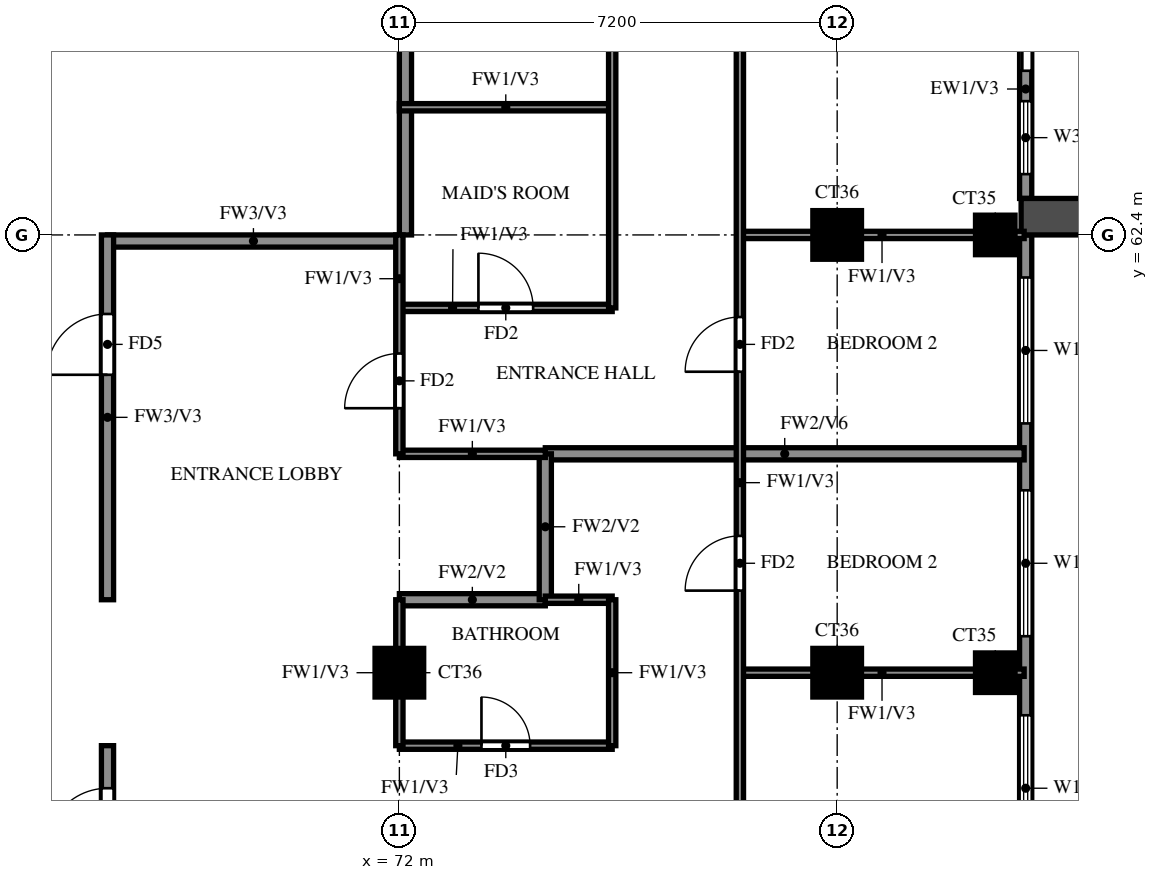
"""IFC4 building model, lengths in metres.
Left out: names, types, materials, properties, quantities, classifications, styles, units other than length and angle.
Written with IfcOpenShell. Run it as: python <this file> out.ifc"""

import sys

from ifc_helpers import new_model, si_unit, direction, frame, frame_2d, origin, origin_2d, place, context, subcontext, project, spatial, rectangle, extrude, source, transform, mapped, element, fill, save


model = new_model("IFC4")
c1 = context("Model", 3, precision=1e-05, world=origin(), true_north=direction((0.0, 1.0)))
c2 = subcontext(c1, "Body", "Model", "MODEL_VIEW")
j1 = project(units=[si_unit("LENGTHUNIT", "METRE"), si_unit("PLANEANGLEUNIT", "RADIAN")], contexts=[c1])
p1 = place(None, origin())
s1 = spatial("IfcSite", under=j1, at=p1, CompositionType="ELEMENT")
p2 = place(p1, origin())
s2 = spatial("IfcBuilding", under=s1, at=p2, CompositionType="ELEMENT")
p3 = place(p2, frame((0.0, 0.0, 250.0)))
s3 = spatial("IfcBuildingStorey", under=s2, at=p3, CompositionType="ELEMENT", Elevation=250.0)
m1 = source(origin(), c2, "Body", "SweptSolid", [
    extrude(rectangle(XDim=0.8, YDim=0.8, at=origin_2d()), origin(), (0.0, 0.0, 1.0), 3.22),
])
for number, where, z_axis, x_axis in (
    (1, (72.0, 55.2, 0.0), (0.0, 0.0, 1.0), (1.0, 0.0, 0.0)),
    (2, (79.2, 55.2, 0.0), (0.0, 0.0, 1.0), (1.0, 0.0, 0.0)),
):
    element("IfcColumn", number, at=place(p3, frame(where, z_axis=z_axis, x_axis=x_axis)), inside=s3, PredefinedType="COLUMN", context=c2, shape_type="MappedRepresentation", body=[
        mapped(m1, transform((0.0, 0.0, 0.0))),
    ])
m2 = source(origin(), c2, "Body", "SweptSolid", [
    extrude(rectangle(XDim=0.65, YDim=0.65, at=origin_2d()), origin(), (0.0, 0.0, 1.0), 3.22),
])
p4 = place(p3, frame((81.8, 55.2, 0.0), z_axis=(0.0, 0.0, 1.0), x_axis=(1.0, 0.0, 0.0)))
e3 = element("IfcColumn", 3, at=p4, inside=s3, PredefinedType="COLUMN", context=c2, shape_type="MappedRepresentation", body=[
    mapped(m2, transform((0.0, 0.0, 0.0))),
])
p5 = place(p3, frame((79.2, 62.4, 0.0), z_axis=(0.0, 0.0, 1.0), x_axis=(1.0, 0.0, 0.0)))
e4 = element("IfcColumn", 4, at=p5, inside=s3, PredefinedType="COLUMN", context=c2, shape_type="MappedRepresentation", body=[
    mapped(m1, transform((0.0, 0.0, 0.0))),
])
p6 = place(p3, frame((81.8, 62.4, 0.0), z_axis=(0.0, 0.0, 1.0), x_axis=(1.0, 0.0, 0.0)))
e5 = element("IfcColumn", 5, at=p6, inside=s3, PredefinedType="COLUMN", context=c2, shape_type="MappedRepresentation", body=[
    mapped(m2, transform((0.0, 0.0, 0.0))),
])
p7 = place(p3, frame((82.3, 48.2, 0.0), z_axis=(0.0, 0.0, 1.0), x_axis=(0.0, 1.0, 0.0)))
e6 = element("IfcWall", 6, at=p7, inside=s3, PredefinedType="SOLIDWALL", context=c2, shape_type="SweptSolid", body=[
    extrude(rectangle(XDim=14.2, YDim=0.2, at=frame_2d((7.1, 0.0))), origin(), (0.0, 0.0, 1.0), 3.22),
])
p8 = place(p7, frame((0.9, 0.0, 0.6)))
e7 = element("IfcOpeningElement", 7, at=p8, cuts=e6, PredefinedType="OPENING", context=c2, shape_type="SweptSolid", body=[
    extrude(rectangle(XDim=2.4, YDim=2.4, at=frame_2d((1.2, 1.2))), frame((0.0, 0.11, 0.0), z_axis=(0.0, -1.0, 0.0), x_axis=(1.0, 0.0, 0.0)), (0.0, 0.0, 1.0), 0.22),
])
p9 = place(p7, frame((3.9, 0.0, 0.6)))
e8 = element("IfcOpeningElement", 8, at=p9, cuts=e6, PredefinedType="OPENING", context=c2, shape_type="SweptSolid", body=[
    extrude(rectangle(XDim=2.4, YDim=2.4, at=frame_2d((1.2, 1.2))), frame((0.0, 0.11, 0.0), z_axis=(0.0, -1.0, 0.0), x_axis=(1.0, 0.0, 0.0)), (0.0, 0.0, 1.0), 0.22),
])
p10 = place(p7, frame((7.6, 0.0, 0.6)))
e9 = element("IfcOpeningElement", 9, at=p10, cuts=e6, PredefinedType="OPENING", context=c2, shape_type="SweptSolid", body=[
    extrude(rectangle(XDim=2.4, YDim=2.4, at=frame_2d((1.2, 1.2))), frame((0.0, 0.11, 0.0), z_axis=(0.0, -1.0, 0.0), x_axis=(1.0, 0.0, 0.0)), (0.0, 0.0, 1.0), 0.22),
])
p11 = place(p7, frame((11.1, 0.0, 0.6)))
e10 = element("IfcOpeningElement", 10, at=p11, cuts=e6, PredefinedType="OPENING", context=c2, shape_type="SweptSolid", body=[
    extrude(rectangle(XDim=2.4, YDim=2.4, at=frame_2d((1.2, 1.2))), frame((0.0, 0.11, 0.0), z_axis=(0.0, -1.0, 0.0), x_axis=(1.0, 0.0, 0.0)), (0.0, 0.0, 1.0), 0.22),
])
p12 = place(p3, frame((82.3, 63.0, 0.0), z_axis=(0.0, 0.0, 1.0), x_axis=(0.0, 1.0, 0.0)))
e11 = element("IfcWall", 11, at=p12, inside=s3, PredefinedType="SOLIDWALL", context=c2, shape_type="SweptSolid", body=[
    extrude(rectangle(XDim=6.0, YDim=0.2, at=frame_2d((3.0, 0.0))), origin(), (0.0, 0.0, 1.0), 3.22),
])
p13 = place(p12, frame((2.1, 0.0, 0.0)))
e12 = element("IfcOpeningElement", 12, at=p13, cuts=e11, PredefinedType="OPENING", context=c2, shape_type="SweptSolid", body=[
    extrude(rectangle(XDim=1.8, YDim=2.4, at=frame_2d((0.9, 1.2))), frame((0.0, 0.11, 0.0), z_axis=(0.0, -1.0, 0.0), x_axis=(1.0, 0.0, 0.0)), (0.0, 0.0, 1.0), 0.22),
])
p14 = place(p12, frame((0.4, 0.0, 0.6)))
e13 = element("IfcOpeningElement", 13, at=p14, cuts=e11, PredefinedType="OPENING", context=c2, shape_type="SweptSolid", body=[
    extrude(rectangle(XDim=1.2, YDim=2.4, at=frame_2d((0.6, 1.2))), frame((0.0, 0.11, 0.0), z_axis=(0.0, -1.0, 0.0), x_axis=(1.0, 0.0, 0.0)), (0.0, 0.0, 1.0), 0.22),
])
p15 = place(p12, frame((4.4, 0.0, 0.6)))
e14 = element("IfcOpeningElement", 14, at=p15, cuts=e11, PredefinedType="OPENING", context=c2, shape_type="SweptSolid", body=[
    extrude(rectangle(XDim=1.2, YDim=2.4, at=frame_2d((0.6, 1.2))), frame((0.0, 0.11, 0.0), z_axis=(0.0, -1.0, 0.0), x_axis=(1.0, 0.0, 0.0)), (0.0, 0.0, 1.0), 0.22),
])
p16 = place(p3, frame((82.225, 62.7, 0.0), z_axis=(0.0, 0.0, 1.0), x_axis=(1.0, 0.0, 0.0)))
e15 = element("IfcWall", 15, at=p16, inside=s3, PredefinedType="SOLIDWALL", context=c2, shape_type="SweptSolid", body=[
    extrude(rectangle(XDim=2.875, YDim=0.6, at=frame_2d((1.438, 0.0))), origin(), (0.0, 0.0, 1.0), 2.85),
])
p17 = place(p3, frame((67.2, 62.3, 0.0), z_axis=(0.0, 0.0, 1.0), x_axis=(1.0, 0.0, 0.0)))
e16 = element("IfcWall", 16, at=p17, inside=s3, PredefinedType="SOLIDWALL", context=c2, shape_type="SweptSolid", body=[
    extrude(rectangle(XDim=4.8, YDim=0.2, at=frame_2d((2.4, 0.0))), origin(), (0.0, 0.0, 1.0), 3.22),
])
p18 = place(p3, frame((67.2, 45.6, 0.0), z_axis=(0.0, 0.0, 1.0), x_axis=(0.0, 1.0, 0.0)))
e17 = element("IfcWall", 17, at=p18, inside=s3, PredefinedType="SOLIDWALL", context=c2, shape_type="SweptSolid", body=[
    extrude(rectangle(XDim=8.4, YDim=0.2, at=frame_2d((4.2, 0.0))), origin(), (0.0, 0.0, 1.0), 3.22),
])
p19 = place(p18, frame((6.7, 0.0, 0.0)))
e18 = element("IfcOpeningElement", 18, at=p19, cuts=e17, PredefinedType="OPENING", context=c2, shape_type="SweptSolid", body=[
    extrude(rectangle(XDim=1.0, YDim=2.1, at=frame_2d((0.5, 1.05))), frame((0.0, 0.11, 0.0), z_axis=(0.0, -1.0, 0.0), x_axis=(1.0, 0.0, 0.0)), (0.0, 0.0, 1.0), 0.22),
])
p20 = place(p18, frame((0.7, 0.0, 0.0)))
e19 = element("IfcOpeningElement", 19, at=p20, cuts=e17, PredefinedType="OPENING", context=c2, shape_type="SweptSolid", body=[
    extrude(rectangle(XDim=1.0, YDim=2.1, at=frame_2d((0.5, 1.05))), frame((0.0, 0.11, 0.0), z_axis=(0.0, -1.0, 0.0), x_axis=(1.0, 0.0, 0.0)), (0.0, 0.0, 1.0), 0.22),
])
p21 = place(p3, frame((67.2, 56.4, 0.0), z_axis=(0.0, 0.0, 1.0), x_axis=(0.0, 1.0, 0.0)))
e20 = element("IfcWall", 20, at=p21, inside=s3, PredefinedType="SOLIDWALL", context=c2, shape_type="SweptSolid", body=[
    extrude(rectangle(XDim=6.0, YDim=0.2, at=frame_2d((3.0, 0.0))), origin(), (0.0, 0.0, 1.0), 3.22),
])
p22 = place(p21, frame((3.7, 0.0, 0.0)))
e21 = element("IfcOpeningElement", 21, at=p22, cuts=e20, PredefinedType="OPENING", context=c2, shape_type="SweptSolid", body=[
    extrude(rectangle(XDim=1.0, YDim=2.1, at=frame_2d((0.5, 1.05))), frame((0.0, 0.11, 0.0), z_axis=(0.0, -1.0, 0.0), x_axis=(1.0, 0.0, 0.0)), (0.0, 0.0, 1.0), 0.22),
])
p23 = place(p3, frame((72.1, 62.4, 0.0), z_axis=(0.0, 0.0, 1.0), x_axis=(0.0, 1.0, 0.0)))
e22 = element("IfcWall", 22, at=p23, inside=s3, PredefinedType="SOLIDWALL", context=c2, shape_type="SweptSolid", body=[
    extrude(rectangle(XDim=15.6, YDim=0.2, at=frame_2d((7.8, 0.0))), origin(), (0.0, 0.0, 1.0), 3.22),
])
p24 = place(p3, frame((72.0, 56.4, 0.0), z_axis=(0.0, 0.0, 1.0), x_axis=(1.0, 0.0, 0.0)))
e23 = element("IfcWall", 23, at=p24, inside=s3, PredefinedType="SOLIDWALL", context=c2, shape_type="SweptSolid", body=[
    extrude(rectangle(XDim=2.4, YDim=0.2, at=frame_2d((1.2, 0.0))), origin(), (0.0, 0.0, 1.0), 3.22),
])
p25 = place(p3, frame((74.4, 58.8, 0.0), z_axis=(0.0, 0.0, 1.0), x_axis=(1.0, 0.0, 0.0)))
e24 = element("IfcWall", 24, at=p25, inside=s3, PredefinedType="SOLIDWALL", context=c2, shape_type="SweptSolid", body=[
    extrude(rectangle(XDim=7.875, YDim=0.2, at=frame_2d((3.938, 0.0))), origin(), (0.0, 0.0, 1.0), 2.32),
])
p26 = place(p3, frame((74.4, 56.4, 0.0), z_axis=(0.0, 0.0, 1.0), x_axis=(0.0, 1.0, 0.0)))
e25 = element("IfcWall", 25, at=p26, inside=s3, PredefinedType="SOLIDWALL", context=c2, shape_type="SweptSolid", body=[
    extrude(rectangle(XDim=2.4, YDim=0.2, at=frame_2d((1.2, 0.0))), origin(), (0.0, 0.0, 1.0), 3.22),
])
p27 = place(p3, frame((72.0, 54.0, 0.0), z_axis=(0.0, 0.0, 1.0), x_axis=(1.0, 0.0, 0.0)))
e26 = element("IfcWall", 26, at=p27, inside=s3, PredefinedType="PARTITIONING", context=c2, shape_type="SweptSolid", body=[
    extrude(rectangle(XDim=3.5, YDim=0.12, at=frame_2d((1.75, 0.0))), origin(), (0.0, 0.0, 1.0), 3.22),
])
p28 = place(p27, frame((1.35, 0.0, 0.0)))
e27 = element("IfcOpeningElement", 27, at=p28, cuts=e26, PredefinedType="OPENING", context=c2, shape_type="SweptSolid", body=[
    extrude(rectangle(XDim=0.8, YDim=2.1, at=frame_2d((0.4, 1.05))), frame((0.0, 0.07, 0.0), z_axis=(0.0, -1.0, 0.0), x_axis=(1.0, 0.0, 0.0)), (0.0, 0.0, 1.0), 0.14),
])
p29 = place(p3, frame((77.6, 55.2, 0.0), z_axis=(0.0, 0.0, 1.0), x_axis=(1.0, 0.0, 0.0)))
e28 = element("IfcWall", 28, at=p29, inside=s3, PredefinedType="PARTITIONING", context=c2, shape_type="SweptSolid", body=[
    extrude(rectangle(XDim=4.675, YDim=0.12, at=frame_2d((2.337, 0.0))), origin(), (0.0, 0.0, 1.0), 3.22),
])
p30 = place(p3, frame((74.4, 56.4, 0.0), z_axis=(0.0, 0.0, 1.0), x_axis=(1.0, 0.0, 0.0)))
e29 = element("IfcWall", 29, at=p30, inside=s3, PredefinedType="PARTITIONING", context=c2, shape_type="SweptSolid", body=[
    extrude(rectangle(XDim=1.1, YDim=0.12, at=frame_2d((0.55, 0.0))), origin(), (0.0, 0.0, 1.0), 3.22),
])
p31 = place(p3, frame((72.0, 58.8, 0.0), z_axis=(0.0, 0.0, 1.0), x_axis=(1.0, 0.0, 0.0)))
e30 = element("IfcWall", 30, at=p31, inside=s3, PredefinedType="PARTITIONING", context=c2, shape_type="SweptSolid", body=[
    extrude(rectangle(XDim=2.4, YDim=0.12, at=frame_2d((1.2, 0.0))), origin(), (0.0, 0.0, 1.0), 3.22),
])
p32 = place(p3, frame((72.0, 61.2, 0.0), z_axis=(0.0, 0.0, 1.0), x_axis=(1.0, 0.0, 0.0)))
e31 = element("IfcWall", 31, at=p32, inside=s3, PredefinedType="PARTITIONING", context=c2, shape_type="SweptSolid", body=[
    extrude(rectangle(XDim=3.5, YDim=0.12, at=frame_2d((1.75, 0.0))), origin(), (0.0, 0.0, 1.0), 3.22),
])
p33 = place(p32, frame((1.3, 0.0, 0.0)))
e32 = element("IfcOpeningElement", 32, at=p33, cuts=e31, PredefinedType="OPENING", context=c2, shape_type="SweptSolid", body=[
    extrude(rectangle(XDim=0.9, YDim=2.1, at=frame_2d((0.45, 1.05))), frame((0.0, 0.07, 0.0), z_axis=(0.0, -1.0, 0.0), x_axis=(1.0, 0.0, 0.0)), (0.0, 0.0, 1.0), 0.14),
])
p34 = place(p3, frame((77.6, 62.4, 0.0), z_axis=(0.0, 0.0, 1.0), x_axis=(1.0, 0.0, 0.0)))
e33 = element("IfcWall", 33, at=p34, inside=s3, PredefinedType="PARTITIONING", context=c2, shape_type="SweptSolid", body=[
    extrude(rectangle(XDim=4.675, YDim=0.12, at=frame_2d((2.337, 0.0))), origin(), (0.0, 0.0, 1.0), 3.22),
])
p35 = place(p3, frame((72.0, 64.5, 0.0), z_axis=(0.0, 0.0, 1.0), x_axis=(1.0, 0.0, 0.0)))
e34 = element("IfcWall", 34, at=p35, inside=s3, PredefinedType="PARTITIONING", context=c2, shape_type="SweptSolid", body=[
    extrude(rectangle(XDim=3.5, YDim=0.12, at=frame_2d((1.75, 0.0))), origin(), (0.0, 0.0, 1.0), 3.22),
])
p36 = place(p3, frame((72.0, 54.0, 0.0), z_axis=(0.0, 0.0, 1.0), x_axis=(0.0, 1.0, 0.0)))
e35 = element("IfcWall", 35, at=p36, inside=s3, PredefinedType="PARTITIONING", context=c2, shape_type="SweptSolid", body=[
    extrude(rectangle(XDim=2.4, YDim=0.12, at=frame_2d((1.2, 0.0))), origin(), (0.0, 0.0, 1.0), 3.22),
])
p37 = place(p3, frame((72.0, 58.8, 0.0), z_axis=(0.0, 0.0, 1.0), x_axis=(0.0, 1.0, 0.0)))
e36 = element("IfcWall", 36, at=p37, inside=s3, PredefinedType="PARTITIONING", context=c2, shape_type="SweptSolid", body=[
    extrude(rectangle(XDim=3.6, YDim=0.12, at=frame_2d((1.8, 0.0))), origin(), (0.0, 0.0, 1.0), 3.22),
])
p38 = place(p37, frame((0.75, 0.0, 0.0)))
e37 = element("IfcOpeningElement", 37, at=p38, cuts=e36, PredefinedType="OPENING", context=c2, shape_type="SweptSolid", body=[
    extrude(rectangle(XDim=0.9, YDim=2.1, at=frame_2d((0.45, 1.05))), frame((0.0, 0.07, 0.0), z_axis=(0.0, -1.0, 0.0), x_axis=(1.0, 0.0, 0.0)), (0.0, 0.0, 1.0), 0.14),
])
p39 = place(p3, frame((75.5, 54.0, 0.0), z_axis=(0.0, 0.0, 1.0), x_axis=(0.0, 1.0, 0.0)))
e38 = element("IfcWall", 38, at=p39, inside=s3, PredefinedType="PARTITIONING", context=c2, shape_type="SweptSolid", body=[
    extrude(rectangle(XDim=2.4, YDim=0.12, at=frame_2d((1.2, 0.0))), origin(), (0.0, 0.0, 1.0), 3.22),
])
p40 = place(p3, frame((75.5, 61.2, 0.0), z_axis=(0.0, 0.0, 1.0), x_axis=(0.0, 1.0, 0.0)))
e39 = element("IfcWall", 39, at=p40, inside=s3, PredefinedType="PARTITIONING", context=c2, shape_type="SweptSolid", body=[
    extrude(rectangle(XDim=12.0, YDim=0.12, at=frame_2d((6.0, 0.0))), origin(), (0.0, 0.0, 1.0), 3.22),
])
p41 = place(p40, frame((5.3, 0.0, 0.0)))
e40 = element("IfcOpeningElement", 40, at=p41, cuts=e39, PredefinedType="OPENING", context=c2, shape_type="SweptSolid", body=[
    extrude(rectangle(XDim=0.9, YDim=2.1, at=frame_2d((0.45, 1.05))), frame((0.0, 0.07, 0.0), z_axis=(0.0, -1.0, 0.0), x_axis=(1.0, 0.0, 0.0)), (0.0, 0.0, 1.0), 0.14),
])
p42 = place(p40, frame((9.7, 0.0, 0.0)))
e41 = element("IfcOpeningElement", 41, at=p42, cuts=e39, PredefinedType="OPENING", context=c2, shape_type="SweptSolid", body=[
    extrude(rectangle(XDim=0.8, YDim=2.1, at=frame_2d((0.4, 1.05))), frame((0.0, 0.07, 0.0), z_axis=(0.0, -1.0, 0.0), x_axis=(1.0, 0.0, 0.0)), (0.0, 0.0, 1.0), 0.14),
])
p43 = place(p3, frame((77.6, 48.125, 0.0), z_axis=(0.0, 0.0, 1.0), x_axis=(0.0, 1.0, 0.0)))
e42 = element("IfcWall", 42, at=p43, inside=s3, PredefinedType="PARTITIONING", context=c2, shape_type="SweptSolid", body=[
    extrude(rectangle(XDim=21.475, YDim=0.12, at=frame_2d((10.738, 0.0))), origin(), (0.0, 0.0, 1.0), 3.22),
])
p44 = place(p43, frame((2.788, 0.0, 0.0)))
e43 = element("IfcOpeningElement", 43, at=p44, cuts=e42, PredefinedType="OPENING", context=c2, shape_type="SweptSolid", body=[
    extrude(rectangle(XDim=1.5, YDim=2.1, at=frame_2d((0.75, 1.05))), frame((0.0, 0.07, 0.0), z_axis=(0.0, -1.0, 0.0), x_axis=(1.0, 0.0, 0.0)), (0.0, 0.0, 1.0), 0.14),
])
p45 = place(p43, frame((8.425, 0.0, 0.0)))
e44 = element("IfcOpeningElement", 44, at=p45, cuts=e42, PredefinedType="OPENING", context=c2, shape_type="SweptSolid", body=[
    extrude(rectangle(XDim=0.9, YDim=2.1, at=frame_2d((0.45, 1.05))), frame((0.0, 0.07, 0.0), z_axis=(0.0, -1.0, 0.0), x_axis=(1.0, 0.0, 0.0)), (0.0, 0.0, 1.0), 0.14),
])
p46 = place(p43, frame((12.025, 0.0, 0.0)))
e45 = element("IfcOpeningElement", 45, at=p46, cuts=e42, PredefinedType="OPENING", context=c2, shape_type="SweptSolid", body=[
    extrude(rectangle(XDim=0.9, YDim=2.1, at=frame_2d((0.45, 1.05))), frame((0.0, 0.07, 0.0), z_axis=(0.0, -1.0, 0.0), x_axis=(1.0, 0.0, 0.0)), (0.0, 0.0, 1.0), 0.14),
])
p47 = place(p43, frame((17.425, 0.0, 0.0)))
e46 = element("IfcOpeningElement", 46, at=p47, cuts=e42, PredefinedType="OPENING", context=c2, shape_type="SweptSolid", body=[
    extrude(rectangle(XDim=0.9, YDim=2.1, at=frame_2d((0.45, 1.05))), frame((0.0, 0.07, 0.0), z_axis=(0.0, -1.0, 0.0), x_axis=(1.0, 0.0, 0.0)), (0.0, 0.0, 1.0), 0.14),
])
p48 = place(p9, origin())
e47 = element("IfcWindow", 47, at=p48, inside=s3, PartitioningType="DOUBLE_PANEL_VERTICAL", PredefinedType="WINDOW", context=c2, shape_type="SweptSolid", body=[
    extrude(rectangle(XDim=2.4, YDim=2.4, at=frame_2d((1.2, 1.2))), frame((0.0, 0.03, 0.0), z_axis=(0.0, -1.0, 0.0), x_axis=(1.0, 0.0, 0.0)), (0.0, 0.0, 1.0), 0.06),
])
fill(e8, e47)
p49 = place(p10, origin())
e48 = element("IfcWindow", 48, at=p49, inside=s3, PartitioningType="DOUBLE_PANEL_VERTICAL", PredefinedType="WINDOW", context=c2, shape_type="SweptSolid", body=[
    extrude(rectangle(XDim=2.4, YDim=2.4, at=frame_2d((1.2, 1.2))), frame((0.0, 0.03, 0.0), z_axis=(0.0, -1.0, 0.0), x_axis=(1.0, 0.0, 0.0)), (0.0, 0.0, 1.0), 0.06),
])
fill(e9, e48)
p50 = place(p11, origin())
e49 = element("IfcWindow", 49, at=p50, inside=s3, PartitioningType="DOUBLE_PANEL_VERTICAL", PredefinedType="WINDOW", context=c2, shape_type="SweptSolid", body=[
    extrude(rectangle(XDim=2.4, YDim=2.4, at=frame_2d((1.2, 1.2))), frame((0.0, 0.03, 0.0), z_axis=(0.0, -1.0, 0.0), x_axis=(1.0, 0.0, 0.0)), (0.0, 0.0, 1.0), 0.06),
])
fill(e10, e49)
p51 = place(p13, origin())
e50 = element("IfcDoor", 50, at=p51, inside=s3, OperationType="DOUBLE_DOOR_SLIDING", PredefinedType="DOOR", context=c2, shape_type="SweptSolid", body=[
    extrude(rectangle(XDim=1.8, YDim=2.4, at=frame_2d((0.9, 1.2))), frame((0.0, 0.025, 0.0), z_axis=(0.0, -1.0, 0.0), x_axis=(1.0, 0.0, 0.0)), (0.0, 0.0, 1.0), 0.05),
])
fill(e12, e50)
p52 = place(p14, origin())
e51 = element("IfcWindow", 51, at=p52, inside=s3, PartitioningType="SINGLE_PANEL", PredefinedType="WINDOW", context=c2, shape_type="SweptSolid", body=[
    extrude(rectangle(XDim=1.2, YDim=2.4, at=frame_2d((0.6, 1.2))), frame((0.0, 0.03, 0.0), z_axis=(0.0, -1.0, 0.0), x_axis=(1.0, 0.0, 0.0)), (0.0, 0.0, 1.0), 0.06),
])
fill(e13, e51)
p53 = place(p19, origin())
e52 = element("IfcDoor", 52, at=p53, inside=s3, OperationType="SINGLE_SWING_LEFT", PredefinedType="DOOR", context=c2, shape_type="SweptSolid", body=[
    extrude(rectangle(XDim=1.0, YDim=2.1, at=frame_2d((0.5, 1.05))), frame((0.0, 0.025, 0.0), z_axis=(0.0, -1.0, 0.0), x_axis=(1.0, 0.0, 0.0)), (0.0, 0.0, 1.0), 0.05),
])
fill(e18, e52)
p54 = place(p45, origin())
e53 = element("IfcDoor", 53, at=p54, inside=s3, OperationType="SINGLE_SWING_LEFT", PredefinedType="DOOR", context=c2, shape_type="SweptSolid", body=[
    extrude(rectangle(XDim=0.9, YDim=2.1, at=frame_2d((0.45, 1.05))), frame((0.0, 0.025, 0.0), z_axis=(0.0, -1.0, 0.0), x_axis=(1.0, 0.0, 0.0)), (0.0, 0.0, 1.0), 0.05),
])
fill(e44, e53)
p55 = place(p28, origin())
e54 = element("IfcDoor", 54, at=p55, inside=s3, OperationType="SINGLE_SWING_RIGHT", PredefinedType="DOOR", context=c2, shape_type="SweptSolid", body=[
    extrude(rectangle(XDim=0.8, YDim=2.1, at=frame_2d((0.4, 1.05))), frame((0.0, 0.025, 0.0), z_axis=(0.0, -1.0, 0.0), x_axis=(1.0, 0.0, 0.0)), (0.0, 0.0, 1.0), 0.05),
])
fill(e27, e54)
p56 = place(p38, origin())
e55 = element("IfcDoor", 55, at=p56, inside=s3, OperationType="SINGLE_SWING_LEFT", PredefinedType="DOOR", context=c2, shape_type="SweptSolid", body=[
    extrude(rectangle(XDim=0.9, YDim=2.1, at=frame_2d((0.45, 1.05))), frame((0.0, 0.025, 0.0), z_axis=(0.0, -1.0, 0.0), x_axis=(1.0, 0.0, 0.0)), (0.0, 0.0, 1.0), 0.05),
])
fill(e37, e55)
p57 = place(p22, origin())
e56 = element("IfcDoor", 56, at=p57, inside=s3, OperationType="SINGLE_SWING_LEFT", PredefinedType="DOOR", context=c2, shape_type="SweptSolid", body=[
    extrude(rectangle(XDim=1.0, YDim=2.1, at=frame_2d((0.5, 1.05))), frame((0.0, 0.025, 0.0), z_axis=(0.0, -1.0, 0.0), x_axis=(1.0, 0.0, 0.0)), (0.0, 0.0, 1.0), 0.05),
])
fill(e21, e56)
p58 = place(p46, origin())
e57 = element("IfcDoor", 57, at=p58, inside=s3, OperationType="SINGLE_SWING_RIGHT", PredefinedType="DOOR", context=c2, shape_type="SweptSolid", body=[
    extrude(rectangle(XDim=0.9, YDim=2.1, at=frame_2d((0.45, 1.05))), frame((0.0, 0.025, 0.0), z_axis=(0.0, -1.0, 0.0), x_axis=(1.0, 0.0, 0.0)), (0.0, 0.0, 1.0), 0.05),
])
fill(e45, e57)
p59 = place(p33, origin())
e58 = element("IfcDoor", 58, at=p59, inside=s3, OperationType="SINGLE_SWING_LEFT", PredefinedType="DOOR", context=c2, shape_type="SweptSolid", body=[
    extrude(rectangle(XDim=0.9, YDim=2.1, at=frame_2d((0.45, 1.05))), frame((0.0, 0.025, 0.0), z_axis=(0.0, -1.0, 0.0), x_axis=(1.0, 0.0, 0.0)), (0.0, 0.0, 1.0), 0.05),
])
fill(e32, e58)
save(model, sys.argv[1])
